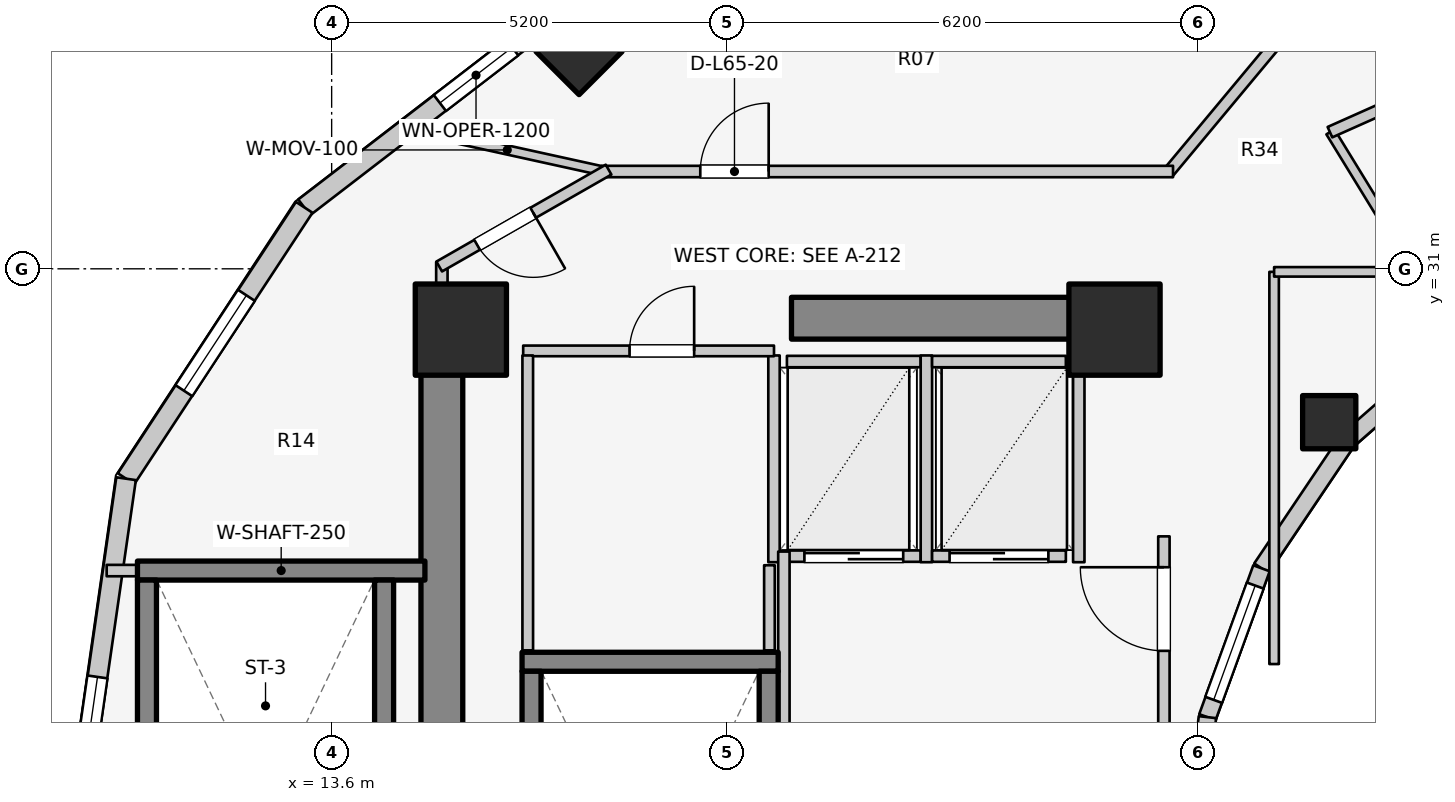
"""IFC4 building model, lengths in metres.
Left out: names, types, materials, properties, quantities, classifications, styles, units other than length and angle.
Written with IfcOpenShell. Run it as: python <this file> out.ifc"""

import sys

from ifc_helpers import new_model, si_unit, direction, frame, frame_2d, origin, origin_2d, place, context, subcontext, project, spatial, rectangle, extrude, element, fill, save


model = new_model("IFC4")
c1 = context("Model", 3, precision=1e-05, world=origin(), true_north=direction((0.0, 1.0)))
c2 = subcontext(c1, "Body", "Model", "MODEL_VIEW")
j1 = project(units=[si_unit("LENGTHUNIT", "METRE"), si_unit("PLANEANGLEUNIT", "RADIAN")], contexts=[c1])
p1 = place(None, origin())
s1 = spatial("IfcSite", under=j1, at=p1, CompositionType="ELEMENT")
p2 = place(p1, origin())
s2 = spatial("IfcBuilding", under=s1, at=p2, CompositionType="ELEMENT")
p3 = place(p2, frame((0.0, 0.0, 214.0)))
s3 = spatial("IfcBuildingStorey", under=s2, at=p3, CompositionType="ELEMENT", Elevation=214.0)
p4 = place(p3, frame((15.05, 17.05, 0.0), z_axis=(0.0, 0.0, 1.0), x_axis=(0.0, 1.0, 0.0)))
e1 = element("IfcWall", 1, at=p4, inside=s3, PredefinedType="SHEAR", context=c2, shape_type="SweptSolid", body=[
    extrude(rectangle(XDim=12.8, YDim=0.55, at=frame_2d((6.4, 0.0))), origin(), (0.0, 0.0, 1.0), 3.1),
])
p5 = place(p3, frame((19.65, 30.35, 0.0), z_axis=(0.0, 0.0, 1.0), x_axis=(1.0, 0.0, 0.0)))
e2 = element("IfcWall", 2, at=p5, inside=s3, PredefinedType="SHEAR", context=c2, shape_type="SweptSolid", body=[
    extrude(rectangle(XDim=4.5, YDim=0.55, at=frame_2d((2.25, 0.0))), origin(), (0.0, 0.0, 1.0), 3.1),
])
p6 = place(p3, frame((16.105, 25.83, 0.0), z_axis=(0.0, 0.0, 1.0), x_axis=(1.0, 0.0, 0.0)))
e3 = element("IfcWall", 3, at=p6, inside=s3, PredefinedType="SOLIDWALL", context=c2, shape_type="SweptSolid", body=[
    extrude(rectangle(XDim=3.37, YDim=0.25, at=frame_2d((1.685, 0.0))), origin(), (0.0, 0.0, 1.0), 3.1),
])
for number, where, z_axis, x_axis in (
    (4, (16.23, 17.895, 0.0), (0.0, 0.0, 1.0), (0.0, 1.0, 0.0)),
    (5, (19.35, 17.895, 0.0), (0.0, 0.0, 1.0), (0.0, 1.0, 0.0)),
):
    element("IfcWall", number, at=place(p3, frame(where, z_axis=z_axis, x_axis=x_axis)), inside=s3, PredefinedType="SOLIDWALL", context=c2, shape_type="SweptSolid", body=[
        extrude(rectangle(XDim=7.81, YDim=0.25, at=frame_2d((3.905, 0.0))), origin(), (0.0, 0.0, 1.0), 3.1),
    ])
p7 = place(p3, frame((11.045, 27.03, 0.0), z_axis=(0.0, 0.0, 1.0), x_axis=(1.0, 0.0, 0.0)))
e6 = element("IfcWall", 6, at=p7, inside=s3, PredefinedType="SOLIDWALL", context=c2, shape_type="SweptSolid", body=[
    extrude(rectangle(XDim=3.782, YDim=0.25, at=frame_2d((1.891, 0.0))), origin(), (0.0, 0.0, 1.0), 3.1),
])
for number, where, z_axis, x_axis in (
    (7, (11.17, 19.095, 0.0), (0.0, 0.0, 1.0), (0.0, 1.0, 0.0)),
    (8, (14.29, 19.095, 0.0), (0.0, 0.0, 1.0), (0.0, 1.0, 0.0)),
):
    element("IfcWall", number, at=place(p3, frame(where, z_axis=z_axis, x_axis=x_axis)), inside=s3, PredefinedType="SOLIDWALL", context=c2, shape_type="SweptSolid", body=[
        extrude(rectangle(XDim=7.81, YDim=0.25, at=frame_2d((3.905, 0.0))), origin(), (0.0, 0.0, 1.0), 3.1),
    ])
for number, where, z_axis, x_axis in (
    (9, (23.9, 30.2, 0.0), (0.0, 0.0, 1.0), (1.0, 0.0, 0.0)),
    (10, (15.3, 30.2, 0.0), (0.0, 0.0, 1.0), (1.0, 0.0, 0.0)),
):
    element("IfcColumn", number, at=place(p3, frame(where, z_axis=z_axis, x_axis=x_axis)), inside=s3, PredefinedType="COLUMN", context=c2, shape_type="SweptSolid", body=[
        extrude(rectangle(XDim=1.2, YDim=1.2, at=origin_2d()), origin(), (0.0, 0.0, 1.0), 3.1),
    ])
p8 = place(p3, frame((26.725, 28.982, 0.0), z_axis=(0.0, 0.0, 1.0), x_axis=(1.0, 0.0, 0.0)))
e11 = element("IfcColumn", 11, at=p8, inside=s3, PredefinedType="COLUMN", context=c2, shape_type="SweptSolid", body=[
    extrude(rectangle(XDim=0.7, YDim=0.7, at=origin_2d()), origin(), (0.0, 0.0, 1.0), 3.1),
])
p9 = place(p3, frame((16.855, 33.857, 0.0), z_axis=(0.0, 0.0, 1.0), x_axis=(-0.707106781187, 0.707106781187, 0.0)))
e12 = element("IfcColumn", 12, at=p9, inside=s3, PredefinedType="COLUMN", context=c2, shape_type="SweptSolid", body=[
    extrude(rectangle(XDim=0.8, YDim=0.8, at=origin_2d()), origin(), (0.0, 0.0, 1.0), 3.1),
])
p10 = place(p3, frame((28.44, 30.032, 0.0), z_axis=(0.0, 0.0, 1.0), x_axis=(-0.752576694707, -0.658504607869, 0.0)))
e13 = element("IfcWall", 13, at=p10, inside=s3, PredefinedType="STANDARD", context=c2, shape_type="SweptSolid", body=[
    extrude(rectangle(XDim=1.959, YDim=0.23, at=frame_2d((0.98, 0.0))), origin(), (0.0, 0.0, 1.0), 2.16),
])
p11 = place(p3, frame((26.965, 28.742, 0.0), z_axis=(0.0, 0.0, 1.0), x_axis=(-0.558197800898, -0.829707909492, 0.0)))
e14 = element("IfcWall", 14, at=p11, inside=s3, PredefinedType="STANDARD", context=c2, shape_type="SweptSolid", body=[
    extrude(rectangle(XDim=2.027, YDim=0.23, at=frame_2d((1.013, 0.0))), origin(), (0.0, 0.0, 1.0), 2.16),
])
p12 = place(p3, frame((25.834, 27.06, 0.0), z_axis=(0.0, 0.0, 1.0), x_axis=(-0.341423187295, -0.93990968033, 0.0)))
e15 = element("IfcWall", 15, at=p12, inside=s3, PredefinedType="STANDARD", context=c2, shape_type="SweptSolid", body=[
    extrude(rectangle(XDim=2.084, YDim=0.23, at=frame_2d((1.042, 0.0))), origin(), (0.0, 0.0, 1.0), 2.84),
])
p13 = place(p12, frame((0.242, 0.0, 0.85)))
e16 = element("IfcOpeningElement", 16, at=p13, cuts=e15, PredefinedType="OPENING", context=c2, shape_type="SweptSolid", body=[
    extrude(rectangle(XDim=1.6, YDim=1.65, at=frame_2d((0.8, 0.825))), frame((0.0, 0.125, 0.0), z_axis=(0.0, -1.0, 0.0), x_axis=(1.0, 0.0, 0.0)), (0.0, 0.0, 1.0), 0.25),
])
p14 = place(p3, frame((25.123, 25.102, 0.0), z_axis=(0.0, 0.0, 1.0), x_axis=(-0.114711713601, -0.993398823617, 0.0)))
e17 = element("IfcWall", 17, at=p14, inside=s3, PredefinedType="STANDARD", context=c2, shape_type="SweptSolid", body=[
    extrude(rectangle(XDim=2.115, YDim=0.23, at=frame_2d((1.058, 0.0))), origin(), (0.0, 0.0, 1.0), 2.84),
])
p15 = place(p3, frame((16.442, 34.272, 0.0), z_axis=(0.0, 0.0, 1.0), x_axis=(-0.792713817907, -0.609593965603, 0.0)))
e18 = element("IfcWall", 18, at=p15, inside=s3, PredefinedType="STANDARD", context=c2, shape_type="SweptSolid", body=[
    extrude(rectangle(XDim=4.041, YDim=0.26, at=frame_2d((2.021, 0.0))), origin(), (0.0, 0.0, 1.0), 2.85),
])
p16 = place(p15, frame((0.589, 0.0, 0.75)))
e19 = element("IfcOpeningElement", 19, at=p16, cuts=e18, PredefinedType="OPENING", context=c2, shape_type="SweptSolid", body=[
    extrude(rectangle(XDim=1.2, YDim=1.5, at=frame_2d((0.6, 0.75))), frame((0.0, 0.14, 0.0), z_axis=(0.0, -1.0, 0.0), x_axis=(1.0, 0.0, 0.0)), (0.0, 0.0, 1.0), 0.28),
])
p17 = place(p3, frame((13.239, 31.809, 0.0), z_axis=(0.0, 0.0, 1.0), x_axis=(-0.548776305075, -0.835969238064, 0.0)))
e20 = element("IfcWall", 20, at=p17, inside=s3, PredefinedType="STANDARD", context=c2, shape_type="SweptSolid", body=[
    extrude(rectangle(XDim=4.271, YDim=0.26, at=frame_2d((2.135, 0.0))), origin(), (0.0, 0.0, 1.0), 2.85),
])
p18 = place(p17, frame((1.385, 0.0, 0.75)))
e21 = element("IfcOpeningElement", 21, at=p18, cuts=e20, PredefinedType="OPENING", context=c2, shape_type="SweptSolid", body=[
    extrude(rectangle(XDim=1.5, YDim=1.6, at=frame_2d((0.75, 0.8))), frame((0.0, 0.14, 0.0), z_axis=(0.0, -1.0, 0.0), x_axis=(1.0, 0.0, 0.0)), (0.0, 0.0, 1.0), 0.28),
])
p19 = place(p3, frame((10.895, 28.239, 0.0), z_axis=(0.0, 0.0, 1.0), x_axis=(-0.142712754019, -0.989764148593, 0.0)))
e22 = element("IfcWall", 22, at=p19, inside=s3, PredefinedType="STANDARD", context=c2, shape_type="SweptSolid", body=[
    extrude(rectangle(XDim=5.293, YDim=0.26, at=frame_2d((2.646, 0.0))), origin(), (0.0, 0.0, 1.0), 2.85),
])
p20 = place(p19, frame((2.635, 0.0, 0.75)))
e23 = element("IfcOpeningElement", 23, at=p20, cuts=e22, PredefinedType="OPENING", context=c2, shape_type="SweptSolid", body=[
    extrude(rectangle(XDim=1.2, YDim=1.5, at=frame_2d((0.6, 0.75))), frame((0.0, 0.14, 0.0), z_axis=(0.0, -1.0, 0.0), x_axis=(1.0, 0.0, 0.0)), (0.0, 0.0, 1.0), 0.28),
])
p21 = place(p3, frame((19.59, 27.22, 0.0), z_axis=(0.0, 0.0, 1.0), x_axis=(1.0, 0.0, 0.0)))
e24 = element("IfcWall", 24, at=p21, inside=s3, PredefinedType="SOLIDWALL", context=c2, shape_type="SweptSolid", body=[
    extrude(rectangle(XDim=1.76, YDim=0.15, at=frame_2d((0.88, 0.0))), origin(), (0.0, 0.0, 1.0), 2.855),
])
p22 = place(p21, frame((0.23, 0.0, 0.0)))
e25 = element("IfcOpeningElement", 25, at=p22, cuts=e24, PredefinedType="OPENING", context=c2, shape_type="SweptSolid", body=[
    extrude(rectangle(XDim=1.3, YDim=2.1, at=frame_2d((0.65, 1.05))), frame((0.0, 0.085, 0.0), z_axis=(0.0, -1.0, 0.0), x_axis=(1.0, 0.0, 0.0)), (0.0, 0.0, 1.0), 0.17),
])
p23 = place(p3, frame((19.59, 29.78, 0.0), z_axis=(0.0, 0.0, 1.0), x_axis=(1.0, 0.0, 0.0)))
e26 = element("IfcWall", 26, at=p23, inside=s3, PredefinedType="SOLIDWALL", context=c2, shape_type="SweptSolid", body=[
    extrude(rectangle(XDim=1.76, YDim=0.15, at=frame_2d((0.88, 0.0))), origin(), (0.0, 0.0, 1.0), 2.855),
])
for number, where, z_axis, x_axis in (
    (27, (19.42, 27.14, 0.0), (0.0, 0.0, 1.0), (0.0, 1.0, 0.0)),
    (28, (21.425, 27.14, 0.0), (0.0, 0.0, 1.0), (0.0, 1.0, 0.0)),
):
    element("IfcWall", number, at=place(p3, frame(where, z_axis=z_axis, x_axis=x_axis)), inside=s3, PredefinedType="SOLIDWALL", context=c2, shape_type="SweptSolid", body=[
        extrude(rectangle(XDim=2.72, YDim=0.15, at=frame_2d((1.36, 0.0))), origin(), (0.0, 0.0, 1.0), 2.855),
    ])
p24 = place(p3, frame((21.5, 27.22, 0.0), z_axis=(0.0, 0.0, 1.0), x_axis=(1.0, 0.0, 0.0)))
e29 = element("IfcWall", 29, at=p24, inside=s3, PredefinedType="SOLIDWALL", context=c2, shape_type="SweptSolid", body=[
    extrude(rectangle(XDim=1.76, YDim=0.15, at=frame_2d((0.88, 0.0))), origin(), (0.0, 0.0, 1.0), 2.855),
])
p25 = place(p24, frame((0.23, 0.0, 0.0)))
e30 = element("IfcOpeningElement", 30, at=p25, cuts=e29, PredefinedType="OPENING", context=c2, shape_type="SweptSolid", body=[
    extrude(rectangle(XDim=1.3, YDim=2.1, at=frame_2d((0.65, 1.05))), frame((0.0, 0.085, 0.0), z_axis=(0.0, -1.0, 0.0), x_axis=(1.0, 0.0, 0.0)), (0.0, 0.0, 1.0), 0.17),
])
p26 = place(p3, frame((21.5, 29.78, 0.0), z_axis=(0.0, 0.0, 1.0), x_axis=(1.0, 0.0, 0.0)))
e31 = element("IfcWall", 31, at=p26, inside=s3, PredefinedType="SOLIDWALL", context=c2, shape_type="SweptSolid", body=[
    extrude(rectangle(XDim=1.76, YDim=0.15, at=frame_2d((0.88, 0.0))), origin(), (0.0, 0.0, 1.0), 2.855),
])
p27 = place(p3, frame((23.43, 27.14, 0.0), z_axis=(0.0, 0.0, 1.0), x_axis=(0.0, 1.0, 0.0)))
e32 = element("IfcWall", 32, at=p27, inside=s3, PredefinedType="SOLIDWALL", context=c2, shape_type="SweptSolid", body=[
    extrude(rectangle(XDim=2.72, YDim=0.15, at=frame_2d((1.36, 0.0))), origin(), (0.0, 0.0, 1.0), 2.855),
])
p28 = place(p3, frame((19.55, 24.08, 0.0), z_axis=(0.0, 0.0, 1.0), x_axis=(0.0, 1.0, 0.0)))
e33 = element("IfcWall", 33, at=p28, inside=s3, PredefinedType="PARTITIONING", context=c2, shape_type="SweptSolid", body=[
    extrude(rectangle(XDim=3.2, YDim=0.15, at=frame_2d((1.6, 0.0))), origin(), (0.0, 0.0, 1.0), 2.855),
])
p29 = place(p3, frame((24.55, 24.08, 0.0), z_axis=(0.0, 0.0, 1.0), x_axis=(0.0, 1.0, 0.0)))
e34 = element("IfcWall", 34, at=p29, inside=s3, PredefinedType="PARTITIONING", context=c2, shape_type="SweptSolid", body=[
    extrude(rectangle(XDim=3.4, YDim=0.15, at=frame_2d((1.7, 0.0))), origin(), (0.0, 0.0, 1.0), 2.855),
])
p30 = place(p29, frame((1.894, 0.0, 0.0)))
e35 = element("IfcOpeningElement", 35, at=p30, cuts=e34, PredefinedType="OPENING", context=c2, shape_type="SweptSolid", body=[
    extrude(rectangle(XDim=1.1, YDim=2.1, at=frame_2d((0.55, 1.05))), frame((0.0, 0.085, 0.0), z_axis=(0.0, -1.0, 0.0), x_axis=(1.0, 0.0, 0.0)), (0.0, 0.0, 1.0), 0.17),
])
p31 = place(p3, frame((16.12, 29.92, 0.0), z_axis=(0.0, 0.0, 1.0), x_axis=(1.0, 0.0, 0.0)))
e36 = element("IfcWall", 36, at=p31, inside=s3, PredefinedType="PLUMBINGWALL", context=c2, shape_type="SweptSolid", body=[
    extrude(rectangle(XDim=3.3, YDim=0.14, at=frame_2d((1.65, 0.0))), origin(), (0.0, 0.0, 1.0), 2.855),
])
p32 = place(p31, frame((1.399, 0.0, 0.0)))
e37 = element("IfcOpeningElement", 37, at=p32, cuts=e36, PredefinedType="OPENING", context=c2, shape_type="SweptSolid", body=[
    extrude(rectangle(XDim=0.85, YDim=2.05, at=frame_2d((0.425, 1.025))), frame((0.0, 0.08, 0.0), z_axis=(0.0, -1.0, 0.0), x_axis=(1.0, 0.0, 0.0)), (0.0, 0.0, 1.0), 0.16),
])
p33 = place(p3, frame((16.18, 25.98, 0.0), z_axis=(0.0, 0.0, 1.0), x_axis=(0.0, 1.0, 0.0)))
e38 = element("IfcWall", 38, at=p33, inside=s3, PredefinedType="PLUMBINGWALL", context=c2, shape_type="SweptSolid", body=[
    extrude(rectangle(XDim=3.88, YDim=0.14, at=frame_2d((1.94, 0.0))), origin(), (0.0, 0.0, 1.0), 2.855),
])
p34 = place(p3, frame((19.36, 25.98, 0.0), z_axis=(0.0, 0.0, 1.0), x_axis=(0.0, 1.0, 0.0)))
e39 = element("IfcWall", 39, at=p34, inside=s3, PredefinedType="PLUMBINGWALL", context=c2, shape_type="SweptSolid", body=[
    extrude(rectangle(XDim=1.12, YDim=0.14, at=frame_2d((0.56, 0.0))), origin(), (0.0, 0.0, 1.0), 2.855),
])
p35 = place(p3, frame((28.45, 30.015, 0.0), z_axis=(0.0, 0.0, 1.0), x_axis=(-0.522763432117, 0.852477796802, 0.0)))
e40 = element("IfcWall", 40, at=p35, inside=s3, PredefinedType="PARTITIONING", context=c2, shape_type="SweptSolid", body=[
    extrude(rectangle(XDim=3.269, YDim=0.125, at=frame_2d((1.635, 0.0))), origin(), (0.0, 0.0, 1.0), 2.376),
])
p36 = place(p3, frame((29.28, 33.933, 0.0), z_axis=(0.0, 0.0, 1.0), x_axis=(-0.913254317828, -0.407389924971, 0.0)))
e41 = element("IfcWall", 41, at=p36, inside=s3, PredefinedType="PARTITIONING", context=c2, shape_type="SweptSolid", body=[
    extrude(rectangle(XDim=2.787, YDim=0.15, at=frame_2d((1.393, 0.0))), origin(), (0.0, 0.0, 1.0), 2.376),
])
p37 = place(p36, frame((0.918, 0.0, 0.0)))
e42 = element("IfcOpeningElement", 42, at=p37, cuts=e41, PredefinedType="OPENING", context=c2, shape_type="SweptSolid", body=[
    extrude(rectangle(XDim=0.95, YDim=2.1, at=frame_2d((0.475, 1.05))), frame((0.0, 0.085, 0.0), z_axis=(0.0, -1.0, 0.0), x_axis=(1.0, 0.0, 0.0)), (0.0, 0.0, 1.0), 0.17),
])
p38 = place(p3, frame((26.0, 25.8, 0.0), z_axis=(0.0, 0.0, 1.0), x_axis=(0.0, 1.0, 0.0)))
e43 = element("IfcWall", 43, at=p38, inside=s3, PredefinedType="PARTITIONING", context=c2, shape_type="SweptSolid", body=[
    extrude(rectangle(XDim=5.16, YDim=0.125, at=frame_2d((2.58, 0.0))), origin(), (0.0, 0.0, 1.0), 2.232),
])
p39 = place(p3, frame((26.0, 30.96, 0.0), z_axis=(0.0, 0.0, 1.0), x_axis=(1.0, 0.0, 0.0)))
e44 = element("IfcWall", 44, at=p39, inside=s3, PredefinedType="PARTITIONING", context=c2, shape_type="SweptSolid", body=[
    extrude(rectangle(XDim=2.6, YDim=0.125, at=frame_2d((1.3, 0.0))), origin(), (0.0, 0.0, 1.0), 2.376),
])
p40 = place(p3, frame((10.64, 27.03, 0.0), z_axis=(0.0, 0.0, 1.0), x_axis=(1.0, 0.0, 0.0)))
e45 = element("IfcWall", 45, at=p40, inside=s3, PredefinedType="PARTITIONING", context=c2, shape_type="SweptSolid", body=[
    extrude(rectangle(XDim=0.4, YDim=0.15, at=frame_2d((0.2, 0.0))), origin(), (0.0, 0.0, 1.0), 2.855),
])
p41 = place(p3, frame((15.05, 29.8, 0.0), z_axis=(0.0, 0.0, 1.0), x_axis=(0.0, 1.0, 0.0)))
e46 = element("IfcWall", 46, at=p41, inside=s3, PredefinedType="PARTITIONING", context=c2, shape_type="SweptSolid", body=[
    extrude(rectangle(XDim=1.29, YDim=0.15, at=frame_2d((0.645, 0.0))), origin(), (0.0, 0.0, 1.0), 2.855),
])
p42 = place(p3, frame((17.249, 32.269, 0.0), z_axis=(0.0, 0.0, 1.0), x_axis=(-0.976641849477, 0.214873678823, 0.0)))
e47 = element("IfcWall", 47, at=p42, inside=s3, PredefinedType="MOVABLE", context=c2, shape_type="SweptSolid", body=[
    extrude(rectangle(XDim=2.74, YDim=0.12, at=frame_2d((1.37, 0.0))), origin(), (0.0, 0.0, 1.0), 2.22),
])
p43 = place(p3, frame((26.016, 33.955, 0.0), z_axis=(0.0, 0.0, 1.0), x_axis=(-0.64030392053, -0.76812166312, 0.0)))
e48 = element("IfcWall", 48, at=p43, inside=s3, PredefinedType="PARTITIONING", context=c2, shape_type="SweptSolid", body=[
    extrude(rectangle(XDim=2.21, YDim=0.15, at=frame_2d((1.105, 0.0))), origin(), (0.0, 0.0, 1.0), 2.376),
])
p44 = place(p3, frame((17.15, 32.28, 0.0), z_axis=(0.0, 0.0, 1.0), x_axis=(1.0, 0.0, 0.0)))
e49 = element("IfcWall", 49, at=p44, inside=s3, PredefinedType="PARTITIONING", context=c2, shape_type="SweptSolid", body=[
    extrude(rectangle(XDim=7.52, YDim=0.15, at=frame_2d((3.76, 0.0))), origin(), (0.0, 0.0, 1.0), 2.376),
])
p45 = place(p44, frame((1.3, 0.0, 0.0)))
e50 = element("IfcOpeningElement", 50, at=p45, cuts=e49, PredefinedType="OPENING", context=c2, shape_type="SweptSolid", body=[
    extrude(rectangle(XDim=0.9, YDim=2.1, at=frame_2d((0.45, 1.05))), frame((0.0, 0.085, 0.0), z_axis=(0.0, -1.0, 0.0), x_axis=(1.0, 0.0, 0.0)), (0.0, 0.0, 1.0), 0.17),
])
p46 = place(p3, frame((17.243, 32.305, 0.0), z_axis=(0.0, 0.0, 1.0), x_axis=(-0.867991349648, -0.496579315857, 0.0)))
e51 = element("IfcWall", 51, at=p46, inside=s3, PredefinedType="PARTITIONING", context=c2, shape_type="SweptSolid", body=[
    extrude(rectangle(XDim=2.567, YDim=0.15, at=frame_2d((1.283, 0.0))), origin(), (0.0, 0.0, 1.0), 2.22),
])
p47 = place(p46, frame((1.143, 0.0, 0.0)))
e52 = element("IfcOpeningElement", 52, at=p47, cuts=e51, PredefinedType="OPENING", context=c2, shape_type="SweptSolid", body=[
    extrude(rectangle(XDim=0.85, YDim=2.05, at=frame_2d((0.425, 1.025))), frame((0.0, 0.085, 0.0), z_axis=(0.0, -1.0, 0.0), x_axis=(1.0, 0.0, 0.0)), (0.0, 0.0, 1.0), 0.17),
])
p48 = place(p13, origin())
e53 = element("IfcWindow", 53, at=p48, inside=s3, PartitioningType="SINGLE_PANEL", PredefinedType="WINDOW", context=c2, shape_type="SweptSolid", body=[
    extrude(rectangle(XDim=1.6, YDim=1.65, at=frame_2d((0.8, 0.825))), frame((0.0, 0.03, 0.0), z_axis=(0.0, -1.0, 0.0), x_axis=(1.0, 0.0, 0.0)), (0.0, 0.0, 1.0), 0.06),
])
fill(e16, e53)
p49 = place(p16, origin())
e54 = element("IfcWindow", 54, at=p49, inside=s3, PartitioningType="SINGLE_PANEL", PredefinedType="WINDOW", context=c2, shape_type="SweptSolid", body=[
    extrude(rectangle(XDim=1.2, YDim=1.5, at=frame_2d((0.6, 0.75))), frame((0.0, 0.03, 0.0), z_axis=(0.0, -1.0, 0.0), x_axis=(1.0, 0.0, 0.0)), (0.0, 0.0, 1.0), 0.06),
])
fill(e19, e54)
p50 = place(p18, origin())
e55 = element("IfcWindow", 55, at=p50, inside=s3, PartitioningType="SINGLE_PANEL", PredefinedType="WINDOW", context=c2, shape_type="SweptSolid", body=[
    extrude(rectangle(XDim=1.5, YDim=1.6, at=frame_2d((0.75, 0.8))), frame((0.0, 0.03, 0.0), z_axis=(0.0, -1.0, 0.0), x_axis=(1.0, 0.0, 0.0)), (0.0, 0.0, 1.0), 0.06),
])
fill(e21, e55)
p51 = place(p20, origin())
e56 = element("IfcWindow", 56, at=p51, inside=s3, PartitioningType="SINGLE_PANEL", PredefinedType="WINDOW", context=c2, shape_type="SweptSolid", body=[
    extrude(rectangle(XDim=1.2, YDim=1.5, at=frame_2d((0.6, 0.75))), frame((0.0, 0.03, 0.0), z_axis=(0.0, -1.0, 0.0), x_axis=(1.0, 0.0, 0.0)), (0.0, 0.0, 1.0), 0.06),
])
fill(e23, e56)
p52 = place(p22, origin())
e57 = element("IfcDoor", 57, at=p52, inside=s3, OperationType="DOUBLE_DOOR_SLIDING", PredefinedType="DOOR", context=c2, shape_type="SweptSolid", body=[
    extrude(rectangle(XDim=1.3, YDim=2.1, at=frame_2d((0.65, 1.05))), frame((0.0, 0.025, 0.0), z_axis=(0.0, -1.0, 0.0), x_axis=(1.0, 0.0, 0.0)), (0.0, 0.0, 1.0), 0.05),
])
fill(e25, e57)
p53 = place(p25, origin())
e58 = element("IfcDoor", 58, at=p53, inside=s3, OperationType="DOUBLE_DOOR_SLIDING", PredefinedType="DOOR", context=c2, shape_type="SweptSolid", body=[
    extrude(rectangle(XDim=1.3, YDim=2.1, at=frame_2d((0.65, 1.05))), frame((0.0, 0.025, 0.0), z_axis=(0.0, -1.0, 0.0), x_axis=(1.0, 0.0, 0.0)), (0.0, 0.0, 1.0), 0.05),
])
fill(e30, e58)
p54 = place(p30, origin())
e59 = element("IfcDoor", 59, at=p54, inside=s3, OperationType="SINGLE_SWING_RIGHT", PredefinedType="DOOR", context=c2, shape_type="SweptSolid", body=[
    extrude(rectangle(XDim=1.1, YDim=2.1, at=frame_2d((0.55, 1.05))), frame((0.0, 0.025, 0.0), z_axis=(0.0, -1.0, 0.0), x_axis=(1.0, 0.0, 0.0)), (0.0, 0.0, 1.0), 0.05),
])
fill(e35, e59)
p55 = place(p32, origin())
e60 = element("IfcDoor", 60, at=p55, inside=s3, OperationType="SINGLE_SWING_RIGHT", PredefinedType="DOOR", context=c2, shape_type="SweptSolid", body=[
    extrude(rectangle(XDim=0.85, YDim=2.05, at=frame_2d((0.425, 1.025))), frame((0.0, 0.025, 0.0), z_axis=(0.0, -1.0, 0.0), x_axis=(1.0, 0.0, 0.0)), (0.0, 0.0, 1.0), 0.05),
])
fill(e37, e60)
p56 = place(p45, origin())
e61 = element("IfcDoor", 61, at=p56, inside=s3, OperationType="SINGLE_SWING_RIGHT", PredefinedType="DOOR", context=c2, shape_type="SweptSolid", body=[
    extrude(rectangle(XDim=0.9, YDim=2.1, at=frame_2d((0.45, 1.05))), frame((0.0, 0.025, 0.0), z_axis=(0.0, -1.0, 0.0), x_axis=(1.0, 0.0, 0.0)), (0.0, 0.0, 1.0), 0.05),
])
fill(e50, e61)
p57 = place(p47, origin())
e62 = element("IfcDoor", 62, at=p57, inside=s3, OperationType="SINGLE_SWING_LEFT", PredefinedType="DOOR", context=c2, shape_type="SweptSolid", body=[
    extrude(rectangle(XDim=0.85, YDim=2.05, at=frame_2d((0.425, 1.025))), frame((0.0, 0.025, 0.0), z_axis=(0.0, -1.0, 0.0), x_axis=(1.0, 0.0, 0.0)), (0.0, 0.0, 1.0), 0.05),
])
fill(e52, e62)
save(model, sys.argv[1])
